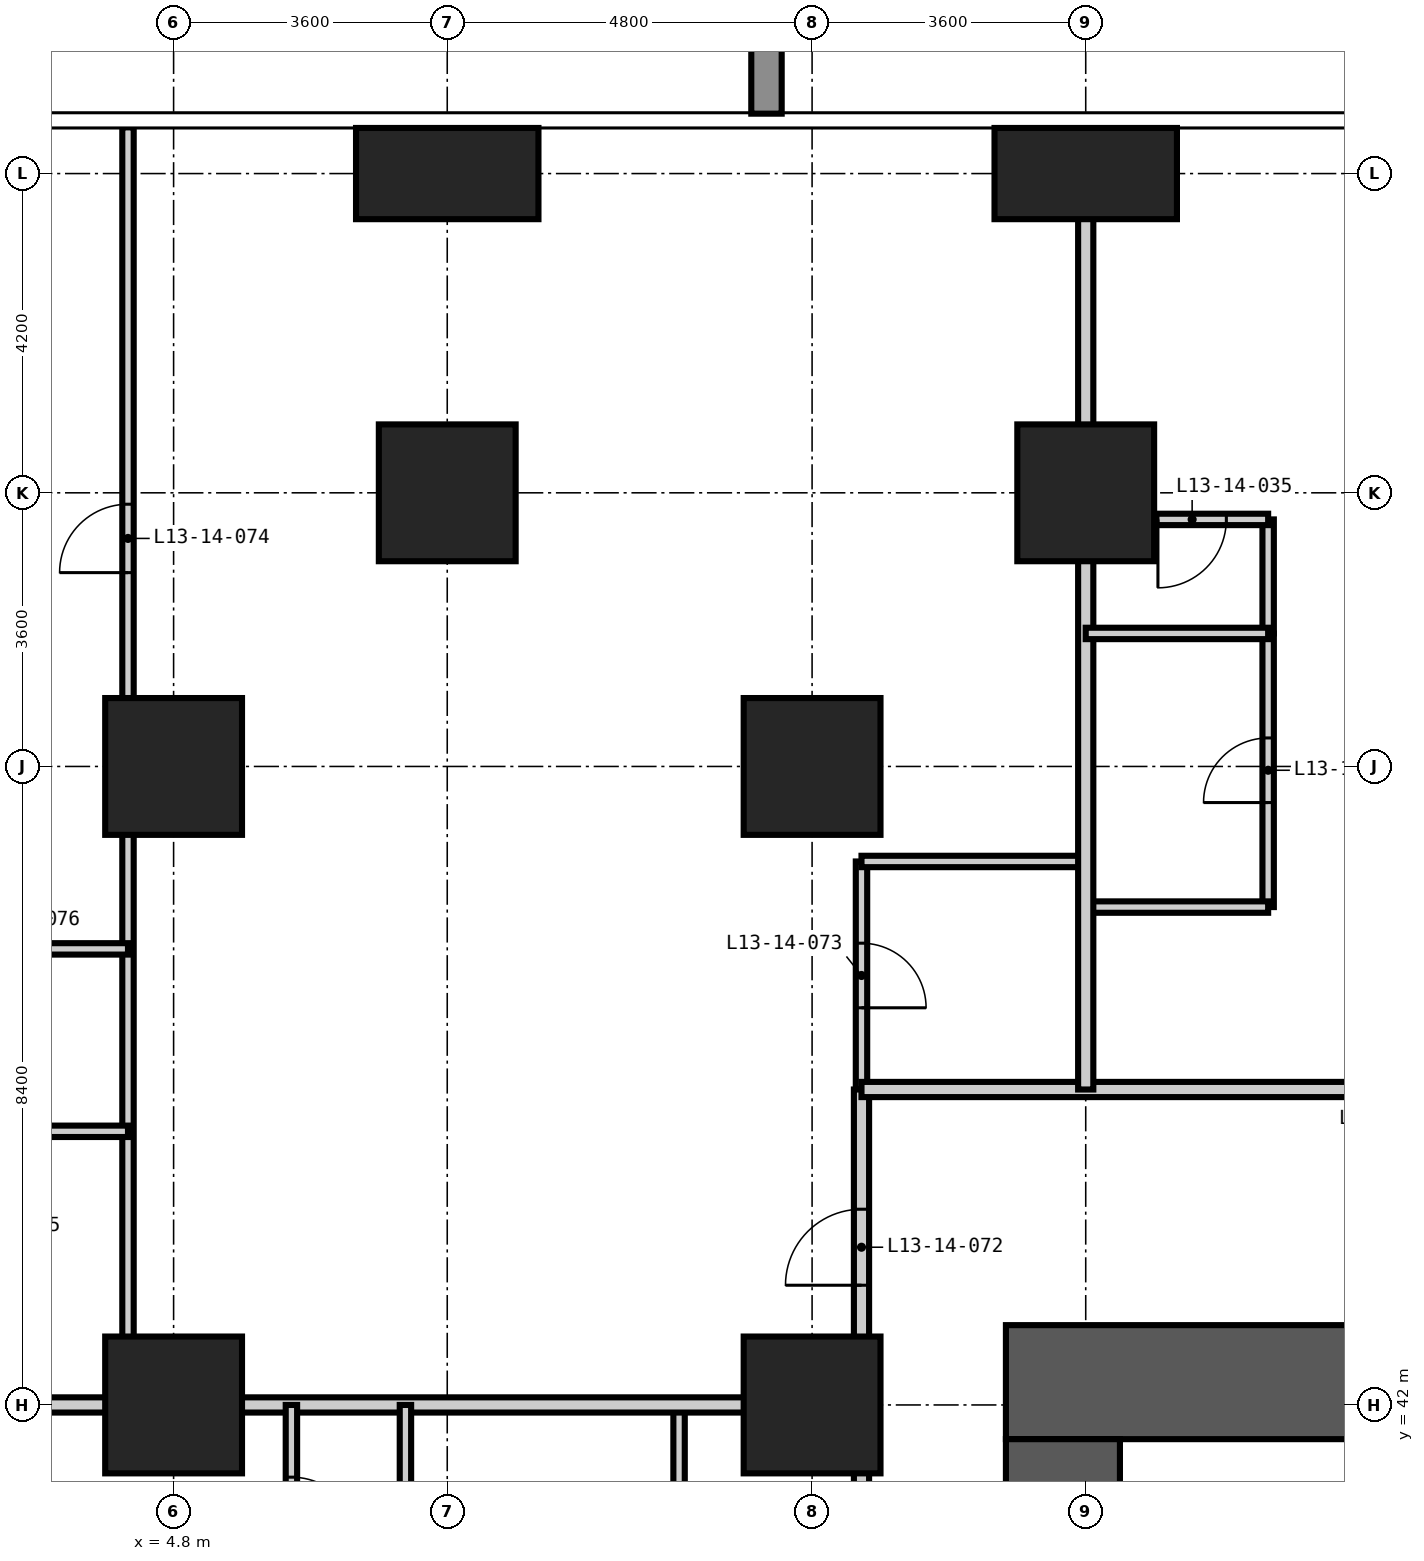
"""IFC4 building model, lengths in metres.
Left out: names, types, materials, properties, quantities, classifications, styles, units other than length and angle.
Written with IfcOpenShell. Run it as: python <this file> out.ifc"""

import sys

from ifc_helpers import new_model, si_unit, direction, frame, frame_2d, origin, origin_2d, place, context, subcontext, project, spatial, rectangle, extrude, element, fill, save


model = new_model("IFC4")
c1 = context("Model", 3, precision=1e-05, world=origin(), true_north=direction((0.0, 1.0)))
c2 = subcontext(c1, "Body", "Model", "MODEL_VIEW")
j1 = project(units=[si_unit("LENGTHUNIT", "METRE"), si_unit("PLANEANGLEUNIT", "RADIAN")], contexts=[c1])
p1 = place(None, origin())
s1 = spatial("IfcSite", under=j1, at=p1, CompositionType="ELEMENT")
p2 = place(p1, origin())
s2 = spatial("IfcBuilding", under=s1, at=p2, CompositionType="ELEMENT")
p3 = place(p2, frame((0.0, 0.0, 55.8)))
s3 = spatial("IfcBuildingStorey", under=s2, at=p3, CompositionType="ELEMENT", Elevation=55.8)
for number, where, z_axis, x_axis in (
    (1, (4.8, 42.0, -0.35), (0.0, 0.0, 1.0), (1.0, 0.0, 0.0)),
    (2, (4.8, 50.4, -0.35), (0.0, 0.0, 1.0), (1.0, 0.0, 0.0)),
    (3, (8.4, 54.0, -0.35), (0.0, 0.0, 1.0), (1.0, 0.0, 0.0)),
):
    element("IfcColumn", number, at=place(p3, frame(where, z_axis=z_axis, x_axis=x_axis)), inside=s3, PredefinedType="COLUMN", context=c2, shape_type="SweptSolid", body=[
        extrude(rectangle(XDim=1.8, YDim=1.8, at=origin_2d()), origin(), (0.0, 0.0, 1.0), 3.6),
    ])
p4 = place(p3, frame((8.4, 58.2, -0.35), z_axis=(0.0, 0.0, 1.0), x_axis=(1.0, 0.0, 0.0)))
e4 = element("IfcColumn", 4, at=p4, inside=s3, PredefinedType="COLUMN", context=c2, shape_type="SweptSolid", body=[
    extrude(rectangle(XDim=2.4, YDim=1.2, at=origin_2d()), origin(), (0.0, 0.0, 1.0), 3.6),
])
for number, where, z_axis, x_axis in (
    (5, (13.2, 42.0, -0.35), (0.0, 0.0, 1.0), (1.0, 0.0, 0.0)),
    (6, (13.2, 50.4, -0.35), (0.0, 0.0, 1.0), (1.0, 0.0, 0.0)),
    (7, (16.8, 54.0, -0.35), (0.0, 0.0, 1.0), (1.0, 0.0, 0.0)),
):
    element("IfcColumn", number, at=place(p3, frame(where, z_axis=z_axis, x_axis=x_axis)), inside=s3, PredefinedType="COLUMN", context=c2, shape_type="SweptSolid", body=[
        extrude(rectangle(XDim=1.8, YDim=1.8, at=origin_2d()), origin(), (0.0, 0.0, 1.0), 3.6),
    ])
p5 = place(p3, frame((16.8, 58.2, -0.35), z_axis=(0.0, 0.0, 1.0), x_axis=(1.0, 0.0, 0.0)))
e8 = element("IfcColumn", 8, at=p5, inside=s3, PredefinedType="COLUMN", context=c2, shape_type="SweptSolid", body=[
    extrude(rectangle(XDim=2.4, YDim=1.2, at=origin_2d()), origin(), (0.0, 0.0, 1.0), 3.6),
])
p6 = place(p3, frame((43.05, 42.3, -0.35), z_axis=(0.0, 0.0, 1.0), x_axis=(-1.0, 0.0, 0.0)))
e9 = element("IfcWall", 9, at=p6, inside=s3, PredefinedType="SHEAR", context=c2, shape_type="SweptSolid", body=[
    extrude(rectangle(XDim=27.3, YDim=1.5, at=frame_2d((13.65, 0.0))), origin(), (0.0, 0.0, 1.0), 3.6),
])
p7 = place(p6, frame((21.55, 0.0, 0.35)))
e10 = element("IfcOpeningElement", 10, at=p7, cuts=e9, PredefinedType="OPENING", context=c2, shape_type="SweptSolid", body=[
    extrude(rectangle(XDim=1.0, YDim=2.1, at=frame_2d((0.5, 1.05))), frame((0.0, 0.76, 0.0), z_axis=(0.0, -1.0, 0.0), x_axis=(1.0, 0.0, 0.0)), (0.0, 0.0, 1.0), 1.52),
])
p8 = place(p6, frame((10.95, 0.0, 0.35)))
e11 = element("IfcOpeningElement", 11, at=p8, cuts=e9, PredefinedType="OPENING", context=c2, shape_type="SweptSolid", body=[
    extrude(rectangle(XDim=1.2, YDim=2.2, at=frame_2d((0.6, 1.1))), frame((0.0, 0.76, 0.0), z_axis=(0.0, -1.0, 0.0), x_axis=(1.0, 0.0, 0.0)), (0.0, 0.0, 1.0), 1.52),
])
p9 = place(p3, frame((16.5, 41.55, -0.35), z_axis=(0.0, 0.0, 1.0), x_axis=(0.0, -1.0, 0.0)))
e12 = element("IfcWall", 12, at=p9, inside=s3, PredefinedType="SHEAR", context=c2, shape_type="SweptSolid", body=[
    extrude(rectangle(XDim=24.3, YDim=1.5, at=frame_2d((12.15, 0.0))), origin(), (0.0, 0.0, 1.0), 3.6),
])
p10 = place(p9, frame((11.25, 0.0, 0.35)))
e13 = element("IfcOpeningElement", 13, at=p10, cuts=e12, PredefinedType="OPENING", context=c2, shape_type="SweptSolid", body=[
    extrude(rectangle(XDim=1.8, YDim=2.2, at=frame_2d((0.9, 1.1))), frame((0.0, 0.76, 0.0), z_axis=(0.0, -1.0, 0.0), x_axis=(1.0, 0.0, 0.0)), (0.0, 0.0, 1.0), 1.52),
])
p11 = place(p9, frame((20.05, 0.0, 0.35)))
e14 = element("IfcOpeningElement", 14, at=p11, cuts=e12, PredefinedType="OPENING", context=c2, shape_type="SweptSolid", body=[
    extrude(rectangle(XDim=1.0, YDim=2.1, at=frame_2d((0.5, 1.05))), frame((0.0, 0.76, 0.0), z_axis=(0.0, -1.0, 0.0), x_axis=(1.0, 0.0, 0.0)), (0.0, 0.0, 1.0), 1.52),
])
p12 = place(p9, frame((5.35, 0.0, 0.35)))
e15 = element("IfcOpeningElement", 15, at=p12, cuts=e12, PredefinedType="OPENING", context=c2, shape_type="SweptSolid", body=[
    extrude(rectangle(XDim=1.0, YDim=2.1, at=frame_2d((0.5, 1.05))), frame((0.0, 0.76, 0.0), z_axis=(0.0, -1.0, 0.0), x_axis=(1.0, 0.0, 0.0)), (0.0, 0.0, 1.0), 1.52),
])
p13 = place(p3, frame((11.45, 39.6, 0.0), z_axis=(0.0, 0.0, 1.0), x_axis=(0.0, 1.0, 0.0)))
e16 = element("IfcWall", 16, at=p13, inside=s3, PredefinedType="PARTITIONING", context=c2, shape_type="SweptSolid", body=[
    extrude(rectangle(XDim=2.4, YDim=0.15, at=frame_2d((1.2, 0.0))), origin(), (0.0, 0.0, 1.0), 3.25),
])
p14 = place(p3, frame((13.85, 46.15, 0.0), z_axis=(0.0, 0.0, 1.0), x_axis=(0.0, 1.0, 0.0)))
e17 = element("IfcWall", 17, at=p14, inside=s3, PredefinedType="PARTITIONING", context=c2, shape_type="SweptSolid", body=[
    extrude(rectangle(XDim=3.0, YDim=0.15, at=frame_2d((1.5, 0.0))), origin(), (0.0, 0.0, 1.0), 3.25),
])
p15 = place(p14, frame((1.075, 0.0, 0.0)))
e18 = element("IfcOpeningElement", 18, at=p15, cuts=e17, PredefinedType="OPENING", context=c2, shape_type="SweptSolid", body=[
    extrude(rectangle(XDim=0.85, YDim=2.1, at=frame_2d((0.425, 1.05))), frame((0.0, 0.085, 0.0), z_axis=(0.0, -1.0, 0.0), x_axis=(1.0, 0.0, 0.0)), (0.0, 0.0, 1.0), 0.17),
])
p16 = place(p3, frame((19.2, 48.55, 0.0), z_axis=(0.0, 0.0, 1.0), x_axis=(0.0, 1.0, 0.0)))
e19 = element("IfcWall", 19, at=p16, inside=s3, PredefinedType="PARTITIONING", context=c2, shape_type="SweptSolid", body=[
    extrude(rectangle(XDim=3.6, YDim=0.15, at=frame_2d((1.8, 0.0))), origin(), (0.0, 0.0, 1.0), 3.25),
])
p17 = place(p16, frame((1.375, 0.0, 0.0)))
e20 = element("IfcOpeningElement", 20, at=p17, cuts=e19, PredefinedType="OPENING", context=c2, shape_type="SweptSolid", body=[
    extrude(rectangle(XDim=0.85, YDim=2.1, at=frame_2d((0.425, 1.05))), frame((0.0, 0.085, 0.0), z_axis=(0.0, -1.0, 0.0), x_axis=(1.0, 0.0, 0.0)), (0.0, 0.0, 1.0), 0.17),
])
p18 = place(p3, frame((16.8, 48.55, 0.0), z_axis=(0.0, 0.0, 1.0), x_axis=(1.0, 0.0, 0.0)))
e21 = element("IfcWall", 21, at=p18, inside=s3, PredefinedType="PARTITIONING", context=c2, shape_type="SweptSolid", body=[
    extrude(rectangle(XDim=2.4, YDim=0.15, at=frame_2d((1.2, 0.0))), origin(), (0.0, 0.0, 1.0), 3.25),
])
p19 = place(p3, frame((13.85, 49.15, 0.0), z_axis=(0.0, 0.0, 1.0), x_axis=(1.0, 0.0, 0.0)))
e22 = element("IfcWall", 22, at=p19, inside=s3, PredefinedType="PARTITIONING", context=c2, shape_type="SweptSolid", body=[
    extrude(rectangle(XDim=2.95, YDim=0.15, at=frame_2d((1.475, 0.0))), origin(), (0.0, 0.0, 1.0), 3.25),
])
p20 = place(p3, frame((13.85, 13.85, 0.0), z_axis=(0.0, 0.0, 1.0), x_axis=(0.0, 1.0, 0.0)))
e23 = element("IfcWall", 23, at=p20, inside=s3, PredefinedType="PARTITIONING", context=c2, shape_type="SweptSolid", body=[
    extrude(rectangle(XDim=32.3, YDim=0.2, at=frame_2d((16.15, 0.0))), origin(), (0.0, 0.0, 1.0), 3.25),
])
p21 = place(p20, frame((5.45, 0.0, 0.0)))
e24 = element("IfcOpeningElement", 24, at=p21, cuts=e23, PredefinedType="OPENING", context=c2, shape_type="SweptSolid", body=[
    extrude(rectangle(XDim=1.0, YDim=2.2, at=frame_2d((0.5, 1.1))), frame((0.0, 0.11, 0.0), z_axis=(0.0, -1.0, 0.0), x_axis=(1.0, 0.0, 0.0)), (0.0, 0.0, 1.0), 0.22),
])
p22 = place(p20, frame((13.85, 0.0, 0.0)))
e25 = element("IfcOpeningElement", 25, at=p22, cuts=e23, PredefinedType="OPENING", context=c2, shape_type="SweptSolid", body=[
    extrude(rectangle(XDim=1.0, YDim=2.2, at=frame_2d((0.5, 1.1))), frame((0.0, 0.11, 0.0), z_axis=(0.0, -1.0, 0.0), x_axis=(1.0, 0.0, 0.0)), (0.0, 0.0, 1.0), 0.22),
])
p23 = place(p20, frame((22.25, 0.0, 0.0)))
e26 = element("IfcOpeningElement", 26, at=p23, cuts=e23, PredefinedType="OPENING", context=c2, shape_type="SweptSolid", body=[
    extrude(rectangle(XDim=1.0, YDim=2.2, at=frame_2d((0.5, 1.1))), frame((0.0, 0.11, 0.0), z_axis=(0.0, -1.0, 0.0), x_axis=(1.0, 0.0, 0.0)), (0.0, 0.0, 1.0), 0.22),
])
p24 = place(p20, frame((0.975, 0.0, 0.0)))
e27 = element("IfcOpeningElement", 27, at=p24, cuts=e23, PredefinedType="OPENING", context=c2, shape_type="SweptSolid", body=[
    extrude(rectangle(XDim=1.0, YDim=2.2, at=frame_2d((0.5, 1.1))), frame((0.0, 0.11, 0.0), z_axis=(0.0, -1.0, 0.0), x_axis=(1.0, 0.0, 0.0)), (0.0, 0.0, 1.0), 0.22),
])
p25 = place(p20, frame((29.725, 0.0, 0.0)))
e28 = element("IfcOpeningElement", 28, at=p25, cuts=e23, PredefinedType="OPENING", context=c2, shape_type="SweptSolid", body=[
    extrude(rectangle(XDim=1.0, YDim=2.2, at=frame_2d((0.5, 1.1))), frame((0.0, 0.11, 0.0), z_axis=(0.0, -1.0, 0.0), x_axis=(1.0, 0.0, 0.0)), (0.0, 0.0, 1.0), 0.22),
])
p26 = place(p3, frame((13.85, 46.15, 0.0), z_axis=(0.0, 0.0, 1.0), x_axis=(1.0, 0.0, 0.0)))
e29 = element("IfcWall", 29, at=p26, inside=s3, PredefinedType="PARTITIONING", context=c2, shape_type="SweptSolid", body=[
    extrude(rectangle(XDim=31.7, YDim=0.2, at=frame_2d((15.85, 0.0))), origin(), (0.0, 0.0, 1.0), 3.25),
])
p27 = place(p26, frame((6.65, 0.0, 0.0)))
e30 = element("IfcOpeningElement", 30, at=p27, cuts=e29, PredefinedType="OPENING", context=c2, shape_type="SweptSolid", body=[
    extrude(rectangle(XDim=1.0, YDim=2.2, at=frame_2d((0.5, 1.1))), frame((0.0, 0.11, 0.0), z_axis=(0.0, -1.0, 0.0), x_axis=(1.0, 0.0, 0.0)), (0.0, 0.0, 1.0), 0.22),
])
p28 = place(p26, frame((15.05, 0.0, 0.0)))
e31 = element("IfcOpeningElement", 31, at=p28, cuts=e29, PredefinedType="OPENING", context=c2, shape_type="SweptSolid", body=[
    extrude(rectangle(XDim=1.0, YDim=2.2, at=frame_2d((0.5, 1.1))), frame((0.0, 0.11, 0.0), z_axis=(0.0, -1.0, 0.0), x_axis=(1.0, 0.0, 0.0)), (0.0, 0.0, 1.0), 0.22),
])
p29 = place(p26, frame((23.45, 0.0, 0.0)))
e32 = element("IfcOpeningElement", 32, at=p29, cuts=e29, PredefinedType="OPENING", context=c2, shape_type="SweptSolid", body=[
    extrude(rectangle(XDim=1.0, YDim=2.2, at=frame_2d((0.5, 1.1))), frame((0.0, 0.11, 0.0), z_axis=(0.0, -1.0, 0.0), x_axis=(1.0, 0.0, 0.0)), (0.0, 0.0, 1.0), 0.22),
])
p30 = place(p3, frame((16.8, 46.15, 0.0), z_axis=(0.0, 0.0, 1.0), x_axis=(0.0, 1.0, 0.0)))
e33 = element("IfcWall", 33, at=p30, inside=s3, PredefinedType="PARTITIONING", context=c2, shape_type="SweptSolid", body=[
    extrude(rectangle(XDim=12.658, YDim=0.2, at=frame_2d((6.329, 0.0))), origin(), (0.0, 0.0, 1.0), 3.25),
])
p31 = place(p3, frame((-0.008, 42.0, 0.0), z_axis=(0.0, 0.0, 1.0), x_axis=(1.0, 0.0, 0.0)))
e34 = element("IfcWall", 34, at=p31, inside=s3, PredefinedType="PARTITIONING", context=c2, shape_type="SweptSolid", body=[
    extrude(rectangle(XDim=13.858, YDim=0.2, at=frame_2d((6.929, 0.0))), origin(), (0.0, 0.0, 1.0), 3.25),
])
p32 = place(p3, frame((4.2, 42.0, 0.0), z_axis=(0.0, 0.0, 1.0), x_axis=(0.0, 1.0, 0.0)))
e35 = element("IfcWall", 35, at=p32, inside=s3, PredefinedType="PARTITIONING", context=c2, shape_type="SweptSolid", body=[
    extrude(rectangle(XDim=16.808, YDim=0.15, at=frame_2d((8.404, 0.0))), origin(), (0.0, 0.0, 1.0), 3.25),
])
p33 = place(p32, frame((10.95, 0.0, 0.0)))
e36 = element("IfcOpeningElement", 36, at=p33, cuts=e35, PredefinedType="OPENING", context=c2, shape_type="SweptSolid", body=[
    extrude(rectangle(XDim=0.9, YDim=2.1, at=frame_2d((0.45, 1.05))), frame((0.0, 0.085, 0.0), z_axis=(0.0, -1.0, 0.0), x_axis=(1.0, 0.0, 0.0)), (0.0, 0.0, 1.0), 0.17),
])
p34 = place(p3, frame((6.35, 39.6, 0.0), z_axis=(0.0, 0.0, 1.0), x_axis=(0.0, 1.0, 0.0)))
e37 = element("IfcWall", 37, at=p34, inside=s3, PredefinedType="PARTITIONING", context=c2, shape_type="SweptSolid", body=[
    extrude(rectangle(XDim=2.4, YDim=0.15, at=frame_2d((1.2, 0.0))), origin(), (0.0, 0.0, 1.0), 3.25),
])
p35 = place(p34, frame((0.55, 0.0, 0.0)))
e38 = element("IfcOpeningElement", 38, at=p35, cuts=e37, PredefinedType="OPENING", context=c2, shape_type="SweptSolid", body=[
    extrude(rectangle(XDim=0.9, YDim=2.1, at=frame_2d((0.45, 1.05))), frame((0.0, 0.085, 0.0), z_axis=(0.0, -1.0, 0.0), x_axis=(1.0, 0.0, 0.0)), (0.0, 0.0, 1.0), 0.17),
])
p36 = place(p3, frame((7.85, 39.6, 0.0), z_axis=(0.0, 0.0, 1.0), x_axis=(0.0, 1.0, 0.0)))
e39 = element("IfcWall", 39, at=p36, inside=s3, PredefinedType="PARTITIONING", context=c2, shape_type="SweptSolid", body=[
    extrude(rectangle(XDim=2.4, YDim=0.15, at=frame_2d((1.2, 0.0))), origin(), (0.0, 0.0, 1.0), 3.25),
])
p37 = place(p3, frame((19.2, 52.15, 0.0), z_axis=(0.0, 0.0, 1.0), x_axis=(0.0, 1.0, 0.0)))
e40 = element("IfcWall", 40, at=p37, inside=s3, PredefinedType="PARTITIONING", context=c2, shape_type="SweptSolid", body=[
    extrude(rectangle(XDim=1.5, YDim=0.15, at=frame_2d((0.75, 0.0))), origin(), (0.0, 0.0, 1.0), 3.25),
])
p38 = place(p3, frame((1.2, 45.6, 0.0), z_axis=(0.0, 0.0, 1.0), x_axis=(1.0, 0.0, 0.0)))
e41 = element("IfcWall", 41, at=p38, inside=s3, PredefinedType="PARTITIONING", context=c2, shape_type="SweptSolid", body=[
    extrude(rectangle(XDim=3.0, YDim=0.15, at=frame_2d((1.5, 0.0))), origin(), (0.0, 0.0, 1.0), 3.25),
])
p39 = place(p3, frame((1.2, 48.0, 0.0), z_axis=(0.0, 0.0, 1.0), x_axis=(1.0, 0.0, 0.0)))
e42 = element("IfcWall", 42, at=p39, inside=s3, PredefinedType="PARTITIONING", context=c2, shape_type="SweptSolid", body=[
    extrude(rectangle(XDim=3.0, YDim=0.15, at=frame_2d((1.5, 0.0))), origin(), (0.0, 0.0, 1.0), 3.25),
])
p40 = place(p39, frame((1.05, 0.0, 0.0)))
e43 = element("IfcOpeningElement", 43, at=p40, cuts=e42, PredefinedType="OPENING", context=c2, shape_type="SweptSolid", body=[
    extrude(rectangle(XDim=0.9, YDim=2.1, at=frame_2d((0.45, 1.05))), frame((0.0, 0.085, 0.0), z_axis=(0.0, -1.0, 0.0), x_axis=(1.0, 0.0, 0.0)), (0.0, 0.0, 1.0), 0.17),
])
p41 = place(p3, frame((16.8, 52.15, 0.0), z_axis=(0.0, 0.0, 1.0), x_axis=(1.0, 0.0, 0.0)))
e44 = element("IfcWall", 44, at=p41, inside=s3, PredefinedType="PARTITIONING", context=c2, shape_type="SweptSolid", body=[
    extrude(rectangle(XDim=2.4, YDim=0.15, at=frame_2d((1.2, 0.0))), origin(), (0.0, 0.0, 1.0), 3.25),
])
p42 = place(p3, frame((16.8, 53.65, 0.0), z_axis=(0.0, 0.0, 1.0), x_axis=(1.0, 0.0, 0.0)))
e45 = element("IfcWall", 45, at=p42, inside=s3, PredefinedType="PARTITIONING", context=c2, shape_type="SweptSolid", body=[
    extrude(rectangle(XDim=2.4, YDim=0.15, at=frame_2d((1.2, 0.0))), origin(), (0.0, 0.0, 1.0), 3.25),
])
p43 = place(p42, frame((0.95, 0.0, 0.0)))
e46 = element("IfcOpeningElement", 46, at=p43, cuts=e45, PredefinedType="OPENING", context=c2, shape_type="SweptSolid", body=[
    extrude(rectangle(XDim=0.9, YDim=2.1, at=frame_2d((0.45, 1.05))), frame((0.0, 0.085, 0.0), z_axis=(0.0, -1.0, 0.0), x_axis=(1.0, 0.0, 0.0)), (0.0, 0.0, 1.0), 0.17),
])
p44 = place(p17, origin())
e47 = element("IfcDoor", 47, at=p44, inside=s3, OperationType="SINGLE_SWING_LEFT", PredefinedType="DOOR", context=c2, shape_type="SweptSolid", body=[
    extrude(rectangle(XDim=0.85, YDim=2.1, at=frame_2d((0.425, 1.05))), frame((0.0, 0.025, 0.0), z_axis=(0.0, -1.0, 0.0), x_axis=(1.0, 0.0, 0.0)), (0.0, 0.0, 1.0), 0.05),
])
fill(e20, e47)
p45 = place(p43, frame((0.9, 0.0, 0.0), z_axis=(0.0, 0.0, 1.0), x_axis=(-1.0, 0.0, 0.0)))
e48 = element("IfcDoor", 48, at=p45, inside=s3, OperationType="SINGLE_SWING_RIGHT", PredefinedType="DOOR", context=c2, shape_type="SweptSolid", body=[
    extrude(rectangle(XDim=0.9, YDim=2.1, at=frame_2d((0.45, 1.05))), frame((0.0, 0.025, 0.0), z_axis=(0.0, -1.0, 0.0), x_axis=(1.0, 0.0, 0.0)), (0.0, 0.0, 1.0), 0.05),
])
fill(e46, e48)
p46 = place(p35, frame((0.9, 0.0, 0.0), z_axis=(0.0, 0.0, 1.0), x_axis=(-1.0, 0.0, 0.0)))
e49 = element("IfcDoor", 49, at=p46, inside=s3, OperationType="SINGLE_SWING_RIGHT", PredefinedType="DOOR", context=c2, shape_type="SweptSolid", body=[
    extrude(rectangle(XDim=0.9, YDim=2.1, at=frame_2d((0.45, 1.05))), frame((0.0, 0.025, 0.0), z_axis=(0.0, -1.0, 0.0), x_axis=(1.0, 0.0, 0.0)), (0.0, 0.0, 1.0), 0.05),
])
fill(e38, e49)
p47 = place(p25, origin())
e50 = element("IfcDoor", 50, at=p47, inside=s3, OperationType="SINGLE_SWING_LEFT", PredefinedType="DOOR", context=c2, shape_type="SweptSolid", body=[
    extrude(rectangle(XDim=1.0, YDim=2.2, at=frame_2d((0.5, 1.1))), frame((0.0, 0.025, 0.0), z_axis=(0.0, -1.0, 0.0), x_axis=(1.0, 0.0, 0.0)), (0.0, 0.0, 1.0), 0.05),
])
fill(e28, e50)
p48 = place(p15, frame((0.85, 0.0, 0.0), z_axis=(0.0, 0.0, 1.0), x_axis=(-1.0, 0.0, 0.0)))
e51 = element("IfcDoor", 51, at=p48, inside=s3, OperationType="SINGLE_SWING_RIGHT", PredefinedType="DOOR", context=c2, shape_type="SweptSolid", body=[
    extrude(rectangle(XDim=0.85, YDim=2.1, at=frame_2d((0.425, 1.05))), frame((0.0, 0.025, 0.0), z_axis=(0.0, -1.0, 0.0), x_axis=(1.0, 0.0, 0.0)), (0.0, 0.0, 1.0), 0.05),
])
fill(e18, e51)
p49 = place(p33, origin())
e52 = element("IfcDoor", 52, at=p49, inside=s3, OperationType="SINGLE_SWING_LEFT", PredefinedType="DOOR", context=c2, shape_type="SweptSolid", body=[
    extrude(rectangle(XDim=0.9, YDim=2.1, at=frame_2d((0.45, 1.05))), frame((0.0, 0.025, 0.0), z_axis=(0.0, -1.0, 0.0), x_axis=(1.0, 0.0, 0.0)), (0.0, 0.0, 1.0), 0.05),
])
fill(e36, e52)
save(model, sys.argv[1])
